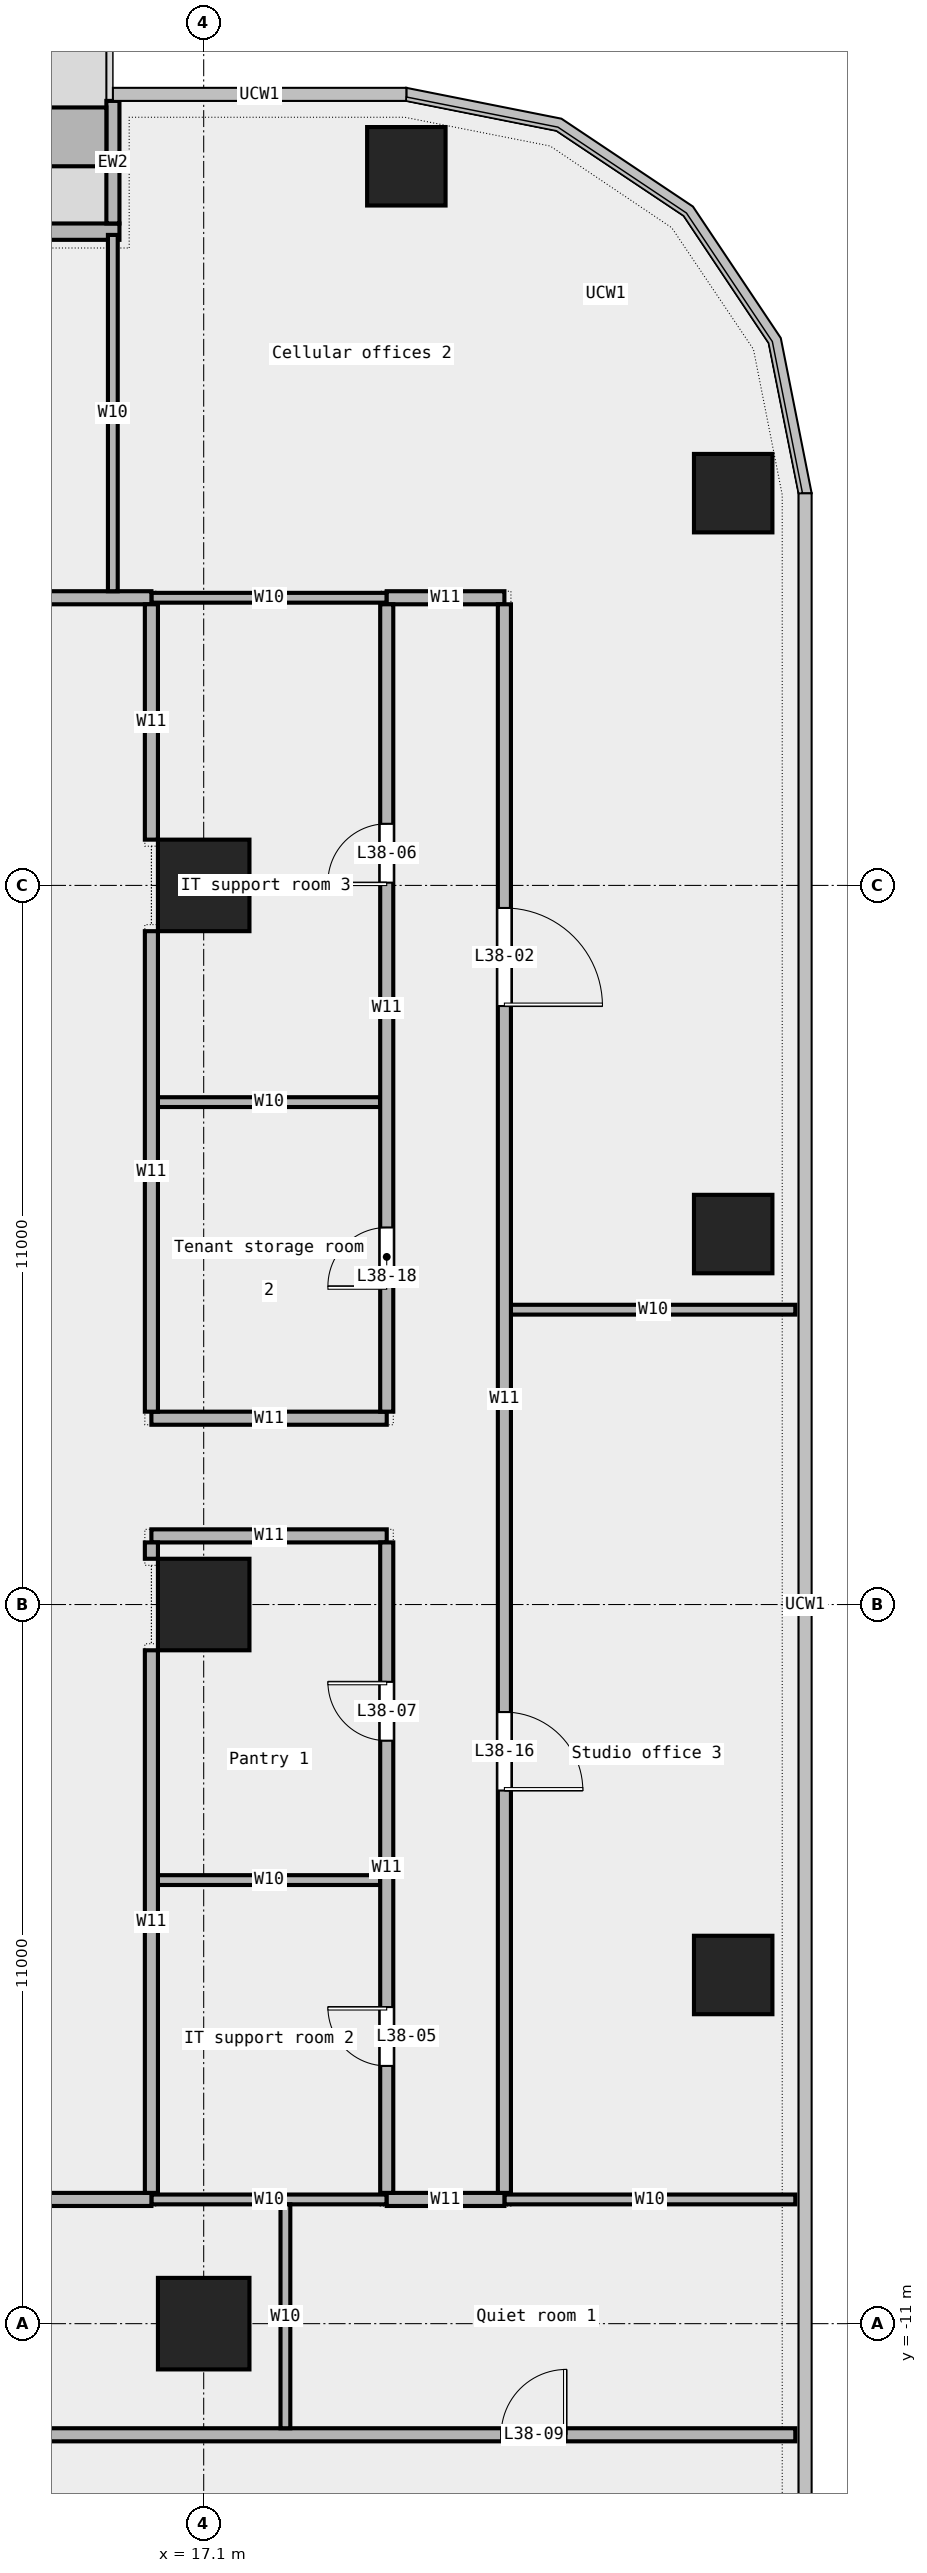
"""IFC4 building model, lengths in metres.
Left out: names, types, materials, properties, quantities, classifications, styles, units other than length and angle.
Written with IfcOpenShell. Run it as: python <this file> out.ifc"""

import sys

from ifc_helpers import new_model, si_unit, direction, frame, frame_2d, origin, origin_2d, place, context, subcontext, project, spatial, rectangle, extrude, element, fill, save


model = new_model("IFC4")
c1 = context("Model", 3, precision=1e-05, world=origin(), true_north=direction((0.0, 1.0)))
c2 = subcontext(c1, "Body", "Model", "MODEL_VIEW")
j1 = project(units=[si_unit("LENGTHUNIT", "METRE"), si_unit("PLANEANGLEUNIT", "RADIAN")], contexts=[c1])
p1 = place(None, origin())
s1 = spatial("IfcSite", under=j1, at=p1, CompositionType="ELEMENT")
p2 = place(p1, origin())
s2 = spatial("IfcBuilding", under=s1, at=p2, CompositionType="ELEMENT")
p3 = place(p2, frame((0.0, 0.0, 185.0)))
s3 = spatial("IfcBuildingStorey", under=s2, at=p3, CompositionType="ELEMENT", Elevation=185.0)
for number, where, z_axis, x_axis in (
    (1, (25.2, -5.667, 0.0), (0.0, 0.0, 1.0), (1.0, 0.0, 0.0)),
    (2, (25.2, 5.667, 0.0), (0.0, 0.0, 1.0), (1.0, 0.0, 0.0)),
    (3, (25.2, 17.0, 0.0), (0.0, 0.0, 1.0), (1.0, 0.0, 0.0)),
    (4, (20.2, 22.0, 0.0), (0.0, 0.0, 1.0), (1.0, 0.0, 0.0)),
):
    element("IfcColumn", number, at=place(p3, frame(where, z_axis=z_axis, x_axis=x_axis)), inside=s3, PredefinedType="COLUMN", context=c2, shape_type="SweptSolid", body=[
        extrude(rectangle(XDim=1.2, YDim=1.2, at=origin_2d()), origin(), (0.0, 0.0, 1.0), 3.6),
    ])
for number, where, z_axis, x_axis in (
    (5, (17.1, -11.0, 0.0), (0.0, 0.0, 1.0), (1.0, 0.0, 0.0)),
    (6, (17.1, 0.0, 0.0), (0.0, 0.0, 1.0), (1.0, 0.0, 0.0)),
    (7, (17.1, 11.0, 0.0), (0.0, 0.0, 1.0), (1.0, 0.0, 0.0)),
):
    element("IfcColumn", number, at=place(p3, frame(where, z_axis=z_axis, x_axis=x_axis)), inside=s3, PredefinedType="COLUMN", context=c2, shape_type="SweptSolid", body=[
        extrude(rectangle(XDim=1.4, YDim=1.4, at=origin_2d()), origin(), (0.0, 0.0, 1.0), 3.6),
    ])
p4 = place(p3, frame((15.811, 21.0, 0.0), z_axis=(0.0, 0.0, 1.0), x_axis=(-1.0, 0.0, 0.0)))
e8 = element("IfcWall", 8, at=p4, inside=s3, PredefinedType="STANDARD", context=c2, shape_type="SweptSolid", body=[
    extrude(rectangle(XDim=13.667, YDim=0.25, at=frame_2d((6.833, 0.0))), origin(), (0.0, 0.0, 1.0), 3.6),
])
p5 = place(p4, frame((1.75, 0.0, 0.45)))
e9 = element("IfcOpeningElement", 9, at=p5, cuts=e8, PredefinedType="OPENING", context=c2, shape_type="SweptSolid", body=[
    extrude(rectangle(XDim=1.5, YDim=2.4, at=frame_2d((0.75, 1.2))), frame((0.0, 0.137, 0.0), z_axis=(0.0, -1.0, 0.0), x_axis=(1.0, 0.0, 0.0)), (0.0, 0.0, 1.0), 0.274),
])
p6 = place(p4, frame((6.75, 0.0, 0.0)))
e10 = element("IfcOpeningElement", 10, at=p6, cuts=e8, PredefinedType="OPENING", context=c2, shape_type="SweptSolid", body=[
    extrude(rectangle(XDim=1.8, YDim=2.4, at=frame_2d((0.9, 1.2))), frame((0.0, 0.137, 0.0), z_axis=(0.0, -1.0, 0.0), x_axis=(1.0, 0.0, 0.0)), (0.0, 0.0, 1.0), 0.274),
])
p7 = place(p4, frame((10.5, 0.0, 0.45)))
e11 = element("IfcOpeningElement", 11, at=p7, cuts=e8, PredefinedType="OPENING", context=c2, shape_type="SweptSolid", body=[
    extrude(rectangle(XDim=1.5, YDim=2.4, at=frame_2d((0.75, 1.2))), frame((0.0, 0.137, 0.0), z_axis=(0.0, -1.0, 0.0), x_axis=(1.0, 0.0, 0.0)), (0.0, 0.0, 1.0), 0.274),
])
p8 = place(p3, frame((15.711, 23.0, 0.0), z_axis=(0.0, 0.0, 1.0), x_axis=(0.0, -1.0, 0.0)))
e12 = element("IfcWall", 12, at=p8, inside=s3, PredefinedType="STANDARD", context=c2, shape_type="SweptSolid", body=[
    extrude(rectangle(XDim=1.875, YDim=0.2, at=frame_2d((0.938, 0.0))), origin(), (0.0, 0.0, 1.0), 3.6),
])
p9 = place(p3, frame((15.611, 22.45, 0.0), z_axis=(0.0, 0.0, 1.0), x_axis=(-1.0, 0.0, 0.0)))
e13 = element("IfcWall", 13, at=p9, inside=s3, PredefinedType="STANDARD", context=c2, shape_type="SweptSolid", body=[
    extrude(rectangle(XDim=3.6, YDim=0.9, at=frame_2d((1.8, 0.0))), origin(), (0.0, 0.0, 1.0), 0.7),
])
p10 = place(p3, frame((0.9, -12.7, 0.0), z_axis=(0.0, 0.0, 1.0), x_axis=(1.0, 0.0, 0.0)))
e14 = element("IfcWall", 14, at=p10, inside=s3, PredefinedType="PARTITIONING", context=c2, shape_type="SweptSolid", body=[
    extrude(rectangle(XDim=25.25, YDim=0.2, at=frame_2d((12.625, 0.0))), origin(), (0.0, 0.0, 1.0), 3.6),
])
p11 = place(p10, frame((20.75, 0.0, 0.0)))
e15 = element("IfcOpeningElement", 15, at=p11, cuts=e14, PredefinedType="OPENING", context=c2, shape_type="SweptSolid", body=[
    extrude(rectangle(XDim=1.0, YDim=2.1, at=frame_2d((0.5, 1.05))), frame((0.0, 0.112, 0.0), z_axis=(0.0, -1.0, 0.0), x_axis=(1.0, 0.0, 0.0)), (0.0, 0.0, 1.0), 0.224),
])
p12 = place(p10, frame((8.125, 0.0, 0.0)))
e16 = element("IfcOpeningElement", 16, at=p12, cuts=e14, PredefinedType="OPENING", context=c2, shape_type="SweptSolid", body=[
    extrude(rectangle(XDim=1.2, YDim=2.1, at=frame_2d((0.6, 1.05))), frame((0.0, 0.112, 0.0), z_axis=(0.0, -1.0, 0.0), x_axis=(1.0, 0.0, 0.0)), (0.0, 0.0, 1.0), 0.224),
])
p13 = place(p3, frame((16.3, -9.1, 0.0), z_axis=(0.0, 0.0, 1.0), x_axis=(1.0, 0.0, 0.0)))
e17 = element("IfcWall", 17, at=p13, inside=s3, PredefinedType="PARTITIONING", context=c2, shape_type="SweptSolid", body=[
    extrude(rectangle(XDim=3.6, YDim=0.15, at=frame_2d((1.8, 0.0))), origin(), (0.0, 0.0, 1.0), 3.6),
])
p14 = place(p3, frame((21.7, -9.1, 0.0), z_axis=(0.0, 0.0, 1.0), x_axis=(1.0, 0.0, 0.0)))
e18 = element("IfcWall", 18, at=p14, inside=s3, PredefinedType="PARTITIONING", context=c2, shape_type="SweptSolid", body=[
    extrude(rectangle(XDim=4.45, YDim=0.15, at=frame_2d((2.225, 0.0))), origin(), (0.0, 0.0, 1.0), 3.6),
])
p15 = place(p3, frame((0.9, -9.1, 0.0), z_axis=(0.0, 0.0, 1.0), x_axis=(1.0, 0.0, 0.0)))
e19 = element("IfcWall", 19, at=p15, inside=s3, PredefinedType="PARTITIONING", context=c2, shape_type="SweptSolid", body=[
    extrude(rectangle(XDim=15.4, YDim=0.2, at=frame_2d((7.7, 0.0))), origin(), (0.0, 0.0, 1.0), 3.6),
])
p16 = place(p3, frame((19.9, -9.1, 0.0), z_axis=(0.0, 0.0, 1.0), x_axis=(1.0, 0.0, 0.0)))
e20 = element("IfcWall", 20, at=p16, inside=s3, PredefinedType="PARTITIONING", context=c2, shape_type="SweptSolid", body=[
    extrude(rectangle(XDim=1.8, YDim=0.2, at=frame_2d((0.9, 0.0))), origin(), (0.0, 0.0, 1.0), 3.6),
])
p17 = place(p3, frame((16.4, -4.215, 0.0), z_axis=(0.0, 0.0, 1.0), x_axis=(1.0, 0.0, 0.0)))
e21 = element("IfcWall", 21, at=p17, inside=s3, PredefinedType="PARTITIONING", context=c2, shape_type="SweptSolid", body=[
    extrude(rectangle(XDim=3.4, YDim=0.15, at=frame_2d((1.7, 0.0))), origin(), (0.0, 0.0, 1.0), 3.6),
])
for number, where, z_axis, x_axis in (
    (22, (16.3, 1.05, 0.0), (0.0, 0.0, 1.0), (1.0, 0.0, 0.0)),
    (23, (16.3, 2.85, 0.0), (0.0, 0.0, 1.0), (1.0, 0.0, 0.0)),
):
    element("IfcWall", number, at=place(p3, frame(where, z_axis=z_axis, x_axis=x_axis)), inside=s3, PredefinedType="PARTITIONING", context=c2, shape_type="SweptSolid", body=[
        extrude(rectangle(XDim=3.6, YDim=0.2, at=frame_2d((1.8, 0.0))), origin(), (0.0, 0.0, 1.0), 3.6),
    ])
p18 = place(p3, frame((21.8, 4.51, 0.0), z_axis=(0.0, 0.0, 1.0), x_axis=(1.0, 0.0, 0.0)))
e24 = element("IfcWall", 24, at=p18, inside=s3, PredefinedType="PARTITIONING", context=c2, shape_type="SweptSolid", body=[
    extrude(rectangle(XDim=4.35, YDim=0.15, at=frame_2d((2.175, 0.0))), origin(), (0.0, 0.0, 1.0), 3.6),
])
p19 = place(p3, frame((16.4, 7.685, 0.0), z_axis=(0.0, 0.0, 1.0), x_axis=(1.0, 0.0, 0.0)))
e25 = element("IfcWall", 25, at=p19, inside=s3, PredefinedType="PARTITIONING", context=c2, shape_type="SweptSolid", body=[
    extrude(rectangle(XDim=3.4, YDim=0.15, at=frame_2d((1.7, 0.0))), origin(), (0.0, 0.0, 1.0), 3.6),
])
p20 = place(p3, frame((16.3, 15.4, 0.0), z_axis=(0.0, 0.0, 1.0), x_axis=(1.0, 0.0, 0.0)))
e26 = element("IfcWall", 26, at=p20, inside=s3, PredefinedType="PARTITIONING", context=c2, shape_type="SweptSolid", body=[
    extrude(rectangle(XDim=3.6, YDim=0.15, at=frame_2d((1.8, 0.0))), origin(), (0.0, 0.0, 1.0), 3.6),
])
p21 = place(p3, frame((-16.3, 15.4, 0.0), z_axis=(0.0, 0.0, 1.0), x_axis=(1.0, 0.0, 0.0)))
e27 = element("IfcWall", 27, at=p21, inside=s3, PredefinedType="PARTITIONING", context=c2, shape_type="SweptSolid", body=[
    extrude(rectangle(XDim=32.6, YDim=0.2, at=frame_2d((16.3, 0.0))), origin(), (0.0, 0.0, 1.0), 3.6),
])
p22 = place(p21, frame((24.677, 0.0, 0.0)))
e28 = element("IfcOpeningElement", 28, at=p22, cuts=e27, PredefinedType="OPENING", context=c2, shape_type="SweptSolid", body=[
    extrude(rectangle(XDim=1.2, YDim=2.1, at=frame_2d((0.6, 1.05))), frame((0.0, 0.112, 0.0), z_axis=(0.0, -1.0, 0.0), x_axis=(1.0, 0.0, 0.0)), (0.0, 0.0, 1.0), 0.224),
])
p23 = place(p21, frame((4.805, 0.0, 0.0)))
e29 = element("IfcOpeningElement", 29, at=p23, cuts=e27, PredefinedType="OPENING", context=c2, shape_type="SweptSolid", body=[
    extrude(rectangle(XDim=1.5, YDim=2.1, at=frame_2d((0.75, 1.05))), frame((0.0, 0.112, 0.0), z_axis=(0.0, -1.0, 0.0), x_axis=(1.0, 0.0, 0.0)), (0.0, 0.0, 1.0), 0.224),
])
p24 = place(p21, frame((14.228, 0.0, 0.0)))
e30 = element("IfcOpeningElement", 30, at=p24, cuts=e27, PredefinedType="OPENING", context=c2, shape_type="SweptSolid", body=[
    extrude(rectangle(XDim=1.2, YDim=2.1, at=frame_2d((0.6, 1.05))), frame((0.0, 0.112, 0.0), z_axis=(0.0, -1.0, 0.0), x_axis=(1.0, 0.0, 0.0)), (0.0, 0.0, 1.0), 0.224),
])
p25 = place(p3, frame((19.9, 15.4, 0.0), z_axis=(0.0, 0.0, 1.0), x_axis=(1.0, 0.0, 0.0)))
e31 = element("IfcWall", 31, at=p25, inside=s3, PredefinedType="PARTITIONING", context=c2, shape_type="SweptSolid", body=[
    extrude(rectangle(XDim=1.8, YDim=0.2, at=frame_2d((0.9, 0.0))), origin(), (0.0, 0.0, 1.0), 3.6),
])
p26 = place(p3, frame((15.71, 15.5, 0.0), z_axis=(0.0, 0.0, 1.0), x_axis=(0.0, 1.0, 0.0)))
e32 = element("IfcWall", 32, at=p26, inside=s3, PredefinedType="PARTITIONING", context=c2, shape_type="SweptSolid", body=[
    extrude(rectangle(XDim=5.45, YDim=0.15, at=frame_2d((2.725, 0.0))), origin(), (0.0, 0.0, 1.0), 3.6),
])
p27 = place(p3, frame((16.3, -9.0, 0.0), z_axis=(0.0, 0.0, 1.0), x_axis=(0.0, 1.0, 0.0)))
e33 = element("IfcWall", 33, at=p27, inside=s3, PredefinedType="PARTITIONING", context=c2, shape_type="SweptSolid", body=[
    extrude(rectangle(XDim=8.3, YDim=0.2, at=frame_2d((4.15, 0.0))), origin(), (0.0, 0.0, 1.0), 3.6),
])
p28 = place(p3, frame((16.3, 0.7, 0.0), z_axis=(0.0, 0.0, 1.0), x_axis=(0.0, 1.0, 0.0)))
e34 = element("IfcWall", 34, at=p28, inside=s3, PredefinedType="PARTITIONING", context=c2, shape_type="SweptSolid", body=[
    extrude(rectangle(XDim=0.25, YDim=0.2, at=frame_2d((0.125, 0.0))), origin(), (0.0, 0.0, 1.0), 3.6),
])
p29 = place(p3, frame((16.3, 2.95, 0.0), z_axis=(0.0, 0.0, 1.0), x_axis=(0.0, 1.0, 0.0)))
e35 = element("IfcWall", 35, at=p29, inside=s3, PredefinedType="PARTITIONING", context=c2, shape_type="SweptSolid", body=[
    extrude(rectangle(XDim=7.35, YDim=0.2, at=frame_2d((3.675, 0.0))), origin(), (0.0, 0.0, 1.0), 3.6),
])
p30 = place(p3, frame((16.3, 11.7, 0.0), z_axis=(0.0, 0.0, 1.0), x_axis=(0.0, 1.0, 0.0)))
e36 = element("IfcWall", 36, at=p30, inside=s3, PredefinedType="PARTITIONING", context=c2, shape_type="SweptSolid", body=[
    extrude(rectangle(XDim=3.6, YDim=0.2, at=frame_2d((1.8, 0.0))), origin(), (0.0, 0.0, 1.0), 3.6),
])
p31 = place(p3, frame((18.35, -12.6, 0.0), z_axis=(0.0, 0.0, 1.0), x_axis=(0.0, 1.0, 0.0)))
e37 = element("IfcWall", 37, at=p31, inside=s3, PredefinedType="PARTITIONING", context=c2, shape_type="SweptSolid", body=[
    extrude(rectangle(XDim=3.425, YDim=0.15, at=frame_2d((1.712, 0.0))), origin(), (0.0, 0.0, 1.0), 3.6),
])
p32 = place(p3, frame((19.9, -9.0, 0.0), z_axis=(0.0, 0.0, 1.0), x_axis=(0.0, 1.0, 0.0)))
e38 = element("IfcWall", 38, at=p32, inside=s3, PredefinedType="PARTITIONING", context=c2, shape_type="SweptSolid", body=[
    extrude(rectangle(XDim=9.95, YDim=0.2, at=frame_2d((4.975, 0.0))), origin(), (0.0, 0.0, 1.0), 3.6),
])
p33 = place(p32, frame((1.942, 0.0, 0.0)))
e39 = element("IfcOpeningElement", 39, at=p33, cuts=e38, PredefinedType="OPENING", context=c2, shape_type="SweptSolid", body=[
    extrude(rectangle(XDim=0.9, YDim=2.1, at=frame_2d((0.45, 1.05))), frame((0.0, 0.112, 0.0), z_axis=(0.0, -1.0, 0.0), x_axis=(1.0, 0.0, 0.0)), (0.0, 0.0, 1.0), 0.224),
])
p34 = place(p32, frame((6.917, 0.0, 0.0)))
e40 = element("IfcOpeningElement", 40, at=p34, cuts=e38, PredefinedType="OPENING", context=c2, shape_type="SweptSolid", body=[
    extrude(rectangle(XDim=0.9, YDim=2.1, at=frame_2d((0.45, 1.05))), frame((0.0, 0.112, 0.0), z_axis=(0.0, -1.0, 0.0), x_axis=(1.0, 0.0, 0.0)), (0.0, 0.0, 1.0), 0.224),
])
p35 = place(p3, frame((19.9, 2.95, 0.0), z_axis=(0.0, 0.0, 1.0), x_axis=(0.0, 1.0, 0.0)))
e41 = element("IfcWall", 41, at=p35, inside=s3, PredefinedType="PARTITIONING", context=c2, shape_type="SweptSolid", body=[
    extrude(rectangle(XDim=12.35, YDim=0.2, at=frame_2d((6.175, 0.0))), origin(), (0.0, 0.0, 1.0), 3.6),
])
p36 = place(p35, frame((8.093, 0.0, 0.0)))
e42 = element("IfcOpeningElement", 42, at=p36, cuts=e41, PredefinedType="OPENING", context=c2, shape_type="SweptSolid", body=[
    extrude(rectangle(XDim=0.9, YDim=2.1, at=frame_2d((0.45, 1.05))), frame((0.0, 0.112, 0.0), z_axis=(0.0, -1.0, 0.0), x_axis=(1.0, 0.0, 0.0)), (0.0, 0.0, 1.0), 0.224),
])
p37 = place(p35, frame((1.917, 0.0, 0.0)))
e43 = element("IfcOpeningElement", 43, at=p37, cuts=e41, PredefinedType="OPENING", context=c2, shape_type="SweptSolid", body=[
    extrude(rectangle(XDim=0.9, YDim=2.1, at=frame_2d((0.45, 1.05))), frame((0.0, 0.112, 0.0), z_axis=(0.0, -1.0, 0.0), x_axis=(1.0, 0.0, 0.0)), (0.0, 0.0, 1.0), 0.224),
])
p38 = place(p3, frame((21.7, -9.0, 0.0), z_axis=(0.0, 0.0, 1.0), x_axis=(0.0, 1.0, 0.0)))
e44 = element("IfcWall", 44, at=p38, inside=s3, PredefinedType="PARTITIONING", context=c2, shape_type="SweptSolid", body=[
    extrude(rectangle(XDim=24.3, YDim=0.2, at=frame_2d((12.15, 0.0))), origin(), (0.0, 0.0, 1.0), 3.6),
])
p39 = place(p38, frame((18.155, 0.0, 0.0)))
e45 = element("IfcOpeningElement", 45, at=p39, cuts=e44, PredefinedType="OPENING", context=c2, shape_type="SweptSolid", body=[
    extrude(rectangle(XDim=1.5, YDim=2.1, at=frame_2d((0.75, 1.05))), frame((0.0, 0.112, 0.0), z_axis=(0.0, -1.0, 0.0), x_axis=(1.0, 0.0, 0.0)), (0.0, 0.0, 1.0), 0.224),
])
p40 = place(p38, frame((6.155, 0.0, 0.0)))
e46 = element("IfcOpeningElement", 46, at=p40, cuts=e44, PredefinedType="OPENING", context=c2, shape_type="SweptSolid", body=[
    extrude(rectangle(XDim=1.2, YDim=2.1, at=frame_2d((0.6, 1.05))), frame((0.0, 0.112, 0.0), z_axis=(0.0, -1.0, 0.0), x_axis=(1.0, 0.0, 0.0)), (0.0, 0.0, 1.0), 0.224),
])
p41 = place(p39, origin())
e47 = element("IfcDoor", 47, at=p41, inside=s3, OperationType="DOUBLE_DOOR_SINGLE_SWING", PredefinedType="DOOR", context=c2, shape_type="SweptSolid", body=[
    extrude(rectangle(XDim=1.5, YDim=2.1, at=frame_2d((0.75, 1.05))), frame((0.0, 0.025, 0.0), z_axis=(0.0, -1.0, 0.0), x_axis=(1.0, 0.0, 0.0)), (0.0, 0.0, 1.0), 0.05),
])
fill(e45, e47)
p42 = place(p33, origin())
e48 = element("IfcDoor", 48, at=p42, inside=s3, OperationType="SINGLE_SWING_RIGHT", PredefinedType="DOOR", context=c2, shape_type="SweptSolid", body=[
    extrude(rectangle(XDim=0.9, YDim=2.1, at=frame_2d((0.45, 1.05))), frame((0.0, 0.025, 0.0), z_axis=(0.0, -1.0, 0.0), x_axis=(1.0, 0.0, 0.0)), (0.0, 0.0, 1.0), 0.05),
])
fill(e39, e48)
p43 = place(p36, origin())
e49 = element("IfcDoor", 49, at=p43, inside=s3, OperationType="SINGLE_SWING_LEFT", PredefinedType="DOOR", context=c2, shape_type="SweptSolid", body=[
    extrude(rectangle(XDim=0.9, YDim=2.1, at=frame_2d((0.45, 1.05))), frame((0.0, 0.025, 0.0), z_axis=(0.0, -1.0, 0.0), x_axis=(1.0, 0.0, 0.0)), (0.0, 0.0, 1.0), 0.05),
])
fill(e42, e49)
p44 = place(p34, origin())
e50 = element("IfcDoor", 50, at=p44, inside=s3, OperationType="SINGLE_SWING_RIGHT", PredefinedType="DOOR", context=c2, shape_type="SweptSolid", body=[
    extrude(rectangle(XDim=0.9, YDim=2.1, at=frame_2d((0.45, 1.05))), frame((0.0, 0.025, 0.0), z_axis=(0.0, -1.0, 0.0), x_axis=(1.0, 0.0, 0.0)), (0.0, 0.0, 1.0), 0.05),
])
fill(e40, e50)
p45 = place(p11, origin())
e51 = element("IfcDoor", 51, at=p45, inside=s3, OperationType="SINGLE_SWING_RIGHT", PredefinedType="DOOR", context=c2, shape_type="SweptSolid", body=[
    extrude(rectangle(XDim=1.0, YDim=2.1, at=frame_2d((0.5, 1.05))), frame((0.0, 0.025, 0.0), z_axis=(0.0, -1.0, 0.0), x_axis=(1.0, 0.0, 0.0)), (0.0, 0.0, 1.0), 0.05),
])
fill(e15, e51)
p46 = place(p40, origin())
e52 = element("IfcDoor", 52, at=p46, inside=s3, OperationType="SINGLE_SWING_RIGHT", PredefinedType="DOOR", context=c2, shape_type="SweptSolid", body=[
    extrude(rectangle(XDim=1.2, YDim=2.1, at=frame_2d((0.6, 1.05))), frame((0.0, 0.025, 0.0), z_axis=(0.0, -1.0, 0.0), x_axis=(1.0, 0.0, 0.0)), (0.0, 0.0, 1.0), 0.05),
])
fill(e46, e52)
p47 = place(p37, origin())
e53 = element("IfcDoor", 53, at=p47, inside=s3, OperationType="SINGLE_SWING_LEFT", PredefinedType="DOOR", context=c2, shape_type="SweptSolid", body=[
    extrude(rectangle(XDim=0.9, YDim=2.1, at=frame_2d((0.45, 1.05))), frame((0.0, 0.025, 0.0), z_axis=(0.0, -1.0, 0.0), x_axis=(1.0, 0.0, 0.0)), (0.0, 0.0, 1.0), 0.05),
])
fill(e43, e53)
save(model, sys.argv[1])
